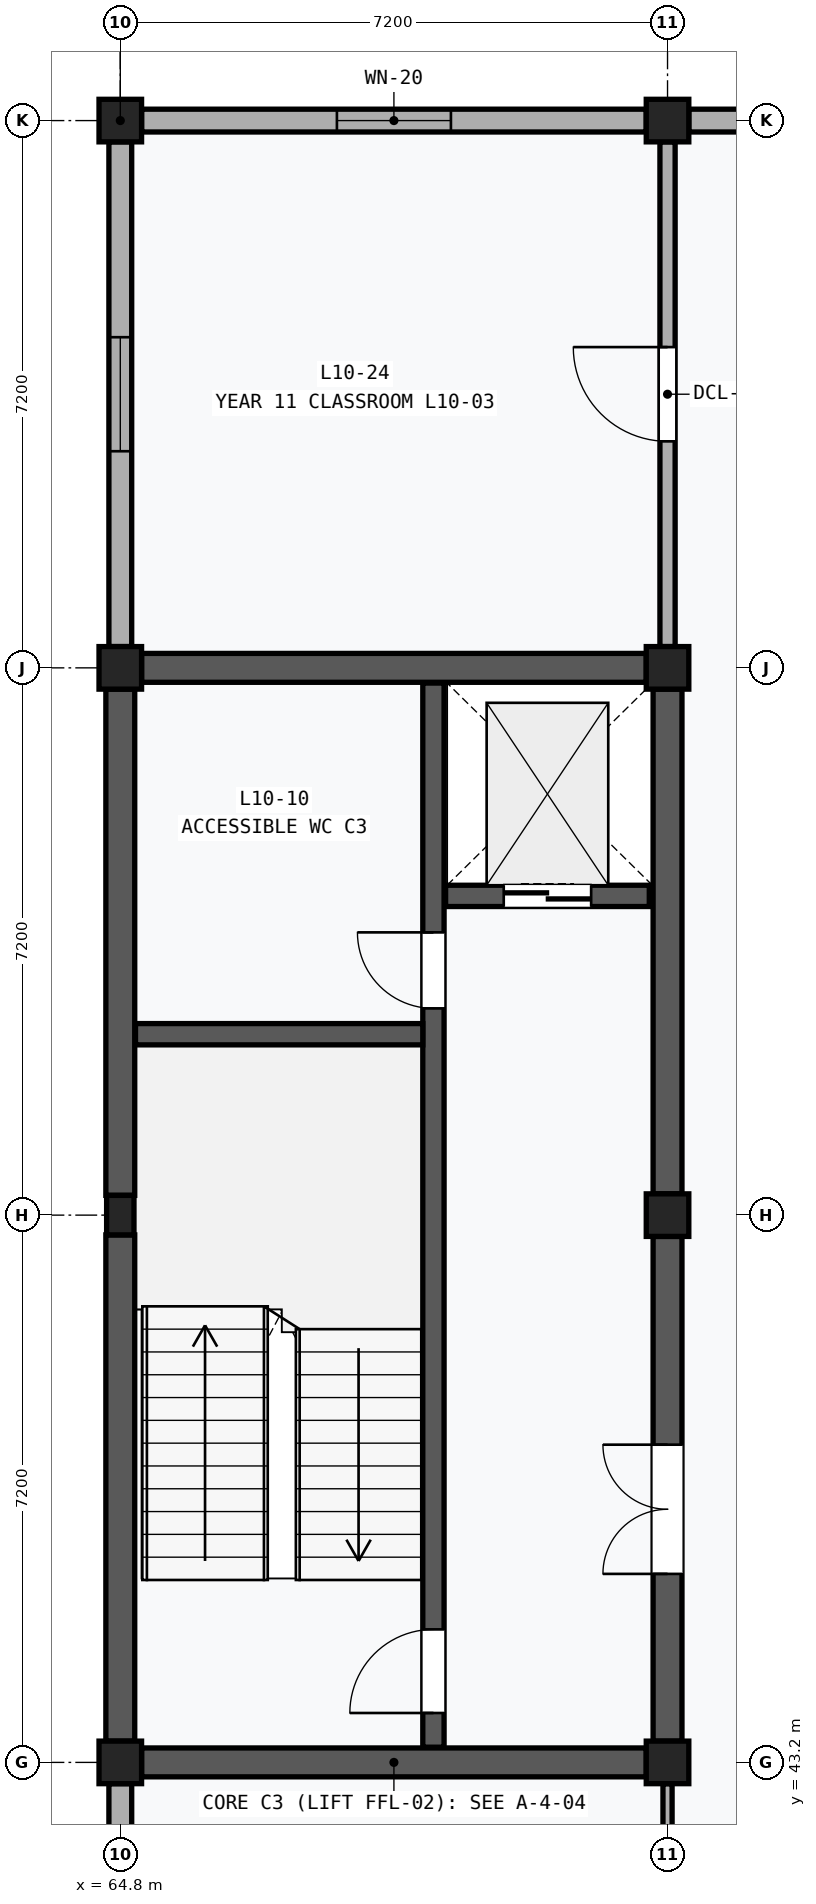
"""IFC4 building model, lengths in metres.
Left out: names, types, materials, properties, quantities, classifications, styles, units other than length and angle.
Written with IfcOpenShell. Run it as: python <this file> out.ifc"""

import sys

from ifc_helpers import new_model, si_unit, direction, frame, frame_2d, origin, origin_2d, place, context, subcontext, project, spatial, rectangle, extrude, element, fill, save


model = new_model("IFC4")
c1 = context("Model", 3, precision=1e-05, world=origin(), true_north=direction((0.0, 1.0)))
c2 = subcontext(c1, "Body", "Model", "MODEL_VIEW")
j1 = project(units=[si_unit("LENGTHUNIT", "METRE"), si_unit("PLANEANGLEUNIT", "RADIAN")], contexts=[c1])
p1 = place(None, origin())
s1 = spatial("IfcSite", under=j1, at=p1, CompositionType="ELEMENT")
p2 = place(p1, origin())
s2 = spatial("IfcBuilding", under=s1, at=p2, CompositionType="ELEMENT")
p3 = place(p2, frame((0.0, 0.0, 42.8)))
s3 = spatial("IfcBuildingStorey", under=s2, at=p3, CompositionType="ELEMENT", Elevation=42.8)
p4 = place(p3, frame((64.8, 43.2, 0.0), z_axis=(0.0, 0.0, 1.0), x_axis=(1.0, 0.0, 0.0)))
e1 = element("IfcColumn", 1, at=p4, inside=s3, PredefinedType="COLUMN", context=c2, shape_type="SweptSolid", body=[
    extrude(rectangle(XDim=0.56, YDim=0.56, at=origin_2d()), origin(), (0.0, 0.0, 1.0), 4.0),
])
p5 = place(p3, frame((64.8, 50.4, 0.0), z_axis=(0.0, 0.0, 1.0), x_axis=(1.0, 0.0, 0.0)))
e2 = element("IfcColumn", 2, at=p5, inside=s3, PredefinedType="PILASTER", context=c2, shape_type="SweptSolid", body=[
    extrude(rectangle(XDim=0.36, YDim=0.52, at=origin_2d()), origin(), (0.0, 0.0, 1.0), 4.0),
])
for number, where, z_axis, x_axis in (
    (3, (64.8, 57.6, 0.0), (0.0, 0.0, 1.0), (1.0, 0.0, 0.0)),
    (4, (64.8, 64.8, 0.0), (0.0, 0.0, 1.0), (1.0, 0.0, 0.0)),
    (5, (72.0, 43.2, 0.0), (0.0, 0.0, 1.0), (1.0, 0.0, 0.0)),
    (6, (72.0, 50.4, 0.0), (0.0, 0.0, 1.0), (1.0, 0.0, 0.0)),
    (7, (72.0, 57.6, 0.0), (0.0, 0.0, 1.0), (1.0, 0.0, 0.0)),
    (8, (72.0, 64.8, 0.0), (0.0, 0.0, 1.0), (1.0, 0.0, 0.0)),
):
    element("IfcColumn", number, at=place(p3, frame(where, z_axis=z_axis, x_axis=x_axis)), inside=s3, PredefinedType="COLUMN", context=c2, shape_type="SweptSolid", body=[
        extrude(rectangle(XDim=0.56, YDim=0.56, at=origin_2d()), origin(), (0.0, 0.0, 1.0), 4.0),
    ])
p6 = place(p3, frame((64.8, 36.28, 0.0), z_axis=(0.0, 0.0, 1.0), x_axis=(0.0, 1.0, 0.0)))
e9 = element("IfcWall", 9, at=p6, inside=s3, PredefinedType="SOLIDWALL", context=c2, shape_type="SweptSolid", body=[
    extrude(rectangle(XDim=6.64, YDim=0.3, at=frame_2d((3.32, 0.0))), origin(), (0.0, 0.0, 1.0), 3.18),
])
p7 = place(p3, frame((65.08, 64.8, 0.0), z_axis=(0.0, 0.0, 1.0), x_axis=(1.0, 0.0, 0.0)))
e10 = element("IfcWall", 10, at=p7, inside=s3, PredefinedType="SOLIDWALL", context=c2, shape_type="SweptSolid", body=[
    extrude(rectangle(XDim=6.64, YDim=0.3, at=frame_2d((3.32, 0.0))), origin(), (0.0, 0.0, 1.0), 3.18),
])
p8 = place(p7, frame((2.57, 0.0, 1.1)))
e11 = element("IfcOpeningElement", 11, at=p8, cuts=e10, PredefinedType="OPENING", context=c2, shape_type="SweptSolid", body=[
    extrude(rectangle(XDim=1.5, YDim=1.35, at=frame_2d((0.75, 0.675))), frame((0.0, 0.162, 0.0), z_axis=(0.0, -1.0, 0.0), x_axis=(1.0, 0.0, 0.0)), (0.0, 0.0, 1.0), 0.324),
])
p9 = place(p3, frame((64.8, 57.88, 0.0), z_axis=(0.0, 0.0, 1.0), x_axis=(0.0, 1.0, 0.0)))
e12 = element("IfcWall", 12, at=p9, inside=s3, PredefinedType="SOLIDWALL", context=c2, shape_type="SweptSolid", body=[
    extrude(rectangle(XDim=6.64, YDim=0.3, at=frame_2d((3.32, 0.0))), origin(), (0.0, 0.0, 1.0), 3.18),
])
p10 = place(p9, frame((2.57, 0.0, 1.1)))
e13 = element("IfcOpeningElement", 13, at=p10, cuts=e12, PredefinedType="OPENING", context=c2, shape_type="SweptSolid", body=[
    extrude(rectangle(XDim=1.5, YDim=1.35, at=frame_2d((0.75, 0.675))), frame((0.0, 0.162, 0.0), z_axis=(0.0, -1.0, 0.0), x_axis=(1.0, 0.0, 0.0)), (0.0, 0.0, 1.0), 0.324),
])
p11 = place(p3, frame((72.28, 64.8, 0.0), z_axis=(0.0, 0.0, 1.0), x_axis=(1.0, 0.0, 0.0)))
e14 = element("IfcWall", 14, at=p11, inside=s3, PredefinedType="SOLIDWALL", context=c2, shape_type="SweptSolid", body=[
    extrude(rectangle(XDim=6.74, YDim=0.3, at=frame_2d((3.37, 0.0))), origin(), (0.0, 0.0, 1.0), 3.18),
])
p12 = place(p11, frame((2.47, 0.0, 0.9)))
e15 = element("IfcOpeningElement", 15, at=p12, cuts=e14, PredefinedType="OPENING", context=c2, shape_type="SweptSolid", body=[
    extrude(rectangle(XDim=1.8, YDim=1.8, at=frame_2d((0.9, 0.9))), frame((0.0, 0.162, 0.0), z_axis=(0.0, -1.0, 0.0), x_axis=(1.0, 0.0, 0.0)), (0.0, 0.0, 1.0), 0.324),
])
p13 = place(p3, frame((64.8, 43.48, 0.0), z_axis=(0.0, 0.0, 1.0), x_axis=(0.0, 1.0, 0.0)))
e16 = element("IfcWall", 16, at=p13, inside=s3, PredefinedType="SHEAR", context=c2, shape_type="SweptSolid", body=[
    extrude(rectangle(XDim=6.66, YDim=0.38, at=frame_2d((3.33, 0.0))), origin(), (0.0, 0.0, 1.0), 3.18),
])
p14 = place(p3, frame((64.8, 50.66, 0.0), z_axis=(0.0, 0.0, 1.0), x_axis=(0.0, 1.0, 0.0)))
e17 = element("IfcWall", 17, at=p14, inside=s3, PredefinedType="SHEAR", context=c2, shape_type="SweptSolid", body=[
    extrude(rectangle(XDim=6.66, YDim=0.38, at=frame_2d((3.33, 0.0))), origin(), (0.0, 0.0, 1.0), 3.18),
])
p15 = place(p3, frame((72.0, 43.48, 0.0), z_axis=(0.0, 0.0, 1.0), x_axis=(0.0, 1.0, 0.0)))
e18 = element("IfcWall", 18, at=p15, inside=s3, PredefinedType="SHEAR", context=c2, shape_type="SweptSolid", body=[
    extrude(rectangle(XDim=6.64, YDim=0.38, at=frame_2d((3.32, 0.0))), origin(), (0.0, 0.0, 1.0), 3.02),
])
p16 = place(p15, frame((2.2, 0.0, 0.0)))
e19 = element("IfcOpeningElement", 19, at=p16, cuts=e18, PredefinedType="OPENING", context=c2, shape_type="SweptSolid", body=[
    extrude(rectangle(XDim=1.7, YDim=2.25, at=frame_2d((0.85, 1.125))), frame((0.0, 0.202, 0.0), z_axis=(0.0, -1.0, 0.0), x_axis=(1.0, 0.0, 0.0)), (0.0, 0.0, 1.0), 0.404),
])
p17 = place(p3, frame((72.0, 50.68, 0.0), z_axis=(0.0, 0.0, 1.0), x_axis=(0.0, 1.0, 0.0)))
e20 = element("IfcWall", 20, at=p17, inside=s3, PredefinedType="SHEAR", context=c2, shape_type="SweptSolid", body=[
    extrude(rectangle(XDim=6.64, YDim=0.38, at=frame_2d((3.32, 0.0))), origin(), (0.0, 0.0, 1.0), 3.02),
])
for number, where, z_axis, x_axis in (
    (21, (65.08, 43.2, 0.0), (0.0, 0.0, 1.0), (1.0, 0.0, 0.0)),
    (22, (65.08, 57.6, 0.0), (0.0, 0.0, 1.0), (1.0, 0.0, 0.0)),
):
    element("IfcWall", number, at=place(p3, frame(where, z_axis=z_axis, x_axis=x_axis)), inside=s3, PredefinedType="SHEAR", context=c2, shape_type="SweptSolid", body=[
        extrude(rectangle(XDim=6.64, YDim=0.38, at=frame_2d((3.32, 0.0))), origin(), (0.0, 0.0, 1.0), 3.02),
    ])
p18 = place(p3, frame((68.92, 43.4, 0.0), z_axis=(0.0, 0.0, 1.0), x_axis=(0.0, 1.0, 0.0)))
e23 = element("IfcWall", 23, at=p18, inside=s3, PredefinedType="SHEAR", context=c2, shape_type="SweptSolid", body=[
    extrude(rectangle(XDim=14.0, YDim=0.28, at=frame_2d((7.0, 0.0))), origin(), (0.0, 0.0, 1.0), 3.75),
])
p19 = place(p18, frame((0.45, 0.0, 0.0)))
e24 = element("IfcOpeningElement", 24, at=p19, cuts=e23, PredefinedType="OPENING", context=c2, shape_type="SweptSolid", body=[
    extrude(rectangle(XDim=1.1, YDim=2.15, at=frame_2d((0.55, 1.075))), frame((0.0, 0.152, 0.0), z_axis=(0.0, -1.0, 0.0), x_axis=(1.0, 0.0, 0.0)), (0.0, 0.0, 1.0), 0.304),
])
p20 = place(p18, frame((9.72, 0.0, 0.0)))
e25 = element("IfcOpeningElement", 25, at=p20, cuts=e23, PredefinedType="OPENING", context=c2, shape_type="SweptSolid", body=[
    extrude(rectangle(XDim=1.0, YDim=2.15, at=frame_2d((0.5, 1.075))), frame((0.0, 0.152, 0.0), z_axis=(0.0, -1.0, 0.0), x_axis=(1.0, 0.0, 0.0)), (0.0, 0.0, 1.0), 0.304),
])
p21 = place(p3, frame((65.0, 52.78, 0.0), z_axis=(0.0, 0.0, 1.0), x_axis=(1.0, 0.0, 0.0)))
e26 = element("IfcWall", 26, at=p21, inside=s3, PredefinedType="SHEAR", context=c2, shape_type="SweptSolid", body=[
    extrude(rectangle(XDim=3.78, YDim=0.28, at=frame_2d((1.89, 0.0))), origin(), (0.0, 0.0, 1.0), 3.75),
])
p22 = place(p3, frame((69.08, 54.6, 0.0), z_axis=(0.0, 0.0, 1.0), x_axis=(1.0, 0.0, 0.0)))
e27 = element("IfcWall", 27, at=p22, inside=s3, PredefinedType="SHEAR", context=c2, shape_type="SweptSolid", body=[
    extrude(rectangle(XDim=2.68, YDim=0.28, at=frame_2d((1.34, 0.0))), origin(), (0.0, 0.0, 1.0), 3.75),
])
p23 = place(p22, frame((0.765, 0.0, 0.0)))
e28 = element("IfcOpeningElement", 28, at=p23, cuts=e27, PredefinedType="OPENING", context=c2, shape_type="SweptSolid", body=[
    extrude(rectangle(XDim=1.15, YDim=2.2, at=frame_2d((0.575, 1.1))), frame((0.0, 0.152, 0.0), z_axis=(0.0, -1.0, 0.0), x_axis=(1.0, 0.0, 0.0)), (0.0, 0.0, 1.0), 0.304),
])
p24 = place(p3, frame((72.0, 36.28, 0.0), z_axis=(0.0, 0.0, 1.0), x_axis=(0.0, 1.0, 0.0)))
e29 = element("IfcWall", 29, at=p24, inside=s3, PredefinedType="MOVABLE", context=c2, shape_type="SweptSolid", body=[
    extrude(rectangle(XDim=6.64, YDim=0.12, at=frame_2d((3.32, 0.0))), origin(), (0.0, 0.0, 1.0), 3.02),
])
p25 = place(p3, frame((72.0, 57.88, 0.0), z_axis=(0.0, 0.0, 1.0), x_axis=(0.0, 1.0, 0.0)))
e30 = element("IfcWall", 30, at=p25, inside=s3, PredefinedType="PARTITIONING", context=c2, shape_type="SweptSolid", body=[
    extrude(rectangle(XDim=6.64, YDim=0.2, at=frame_2d((3.32, 0.0))), origin(), (0.0, 0.0, 1.0), 3.02),
])
p26 = place(p25, frame((2.7, 0.0, 0.0)))
e31 = element("IfcOpeningElement", 31, at=p26, cuts=e30, PredefinedType="OPENING", context=c2, shape_type="SweptSolid", body=[
    extrude(rectangle(XDim=1.24, YDim=2.26, at=frame_2d((0.62, 1.13))), frame((0.0, 0.112, 0.0), z_axis=(0.0, -1.0, 0.0), x_axis=(1.0, 0.0, 0.0)), (0.0, 0.0, 1.0), 0.224),
])
p27 = place(p8, origin())
e32 = element("IfcWindow", 32, at=p27, inside=s3, PartitioningType="SINGLE_PANEL", PredefinedType="WINDOW", context=c2, shape_type="SweptSolid", body=[
    extrude(rectangle(XDim=1.5, YDim=1.35, at=frame_2d((0.75, 0.675))), frame((0.0, 0.03, 0.0), z_axis=(0.0, -1.0, 0.0), x_axis=(1.0, 0.0, 0.0)), (0.0, 0.0, 1.0), 0.06),
])
fill(e11, e32)
p28 = place(p10, origin())
e33 = element("IfcWindow", 33, at=p28, inside=s3, PartitioningType="SINGLE_PANEL", PredefinedType="WINDOW", context=c2, shape_type="SweptSolid", body=[
    extrude(rectangle(XDim=1.5, YDim=1.35, at=frame_2d((0.75, 0.675))), frame((0.0, 0.03, 0.0), z_axis=(0.0, -1.0, 0.0), x_axis=(1.0, 0.0, 0.0)), (0.0, 0.0, 1.0), 0.06),
])
fill(e13, e33)
p29 = place(p16, origin())
e34 = element("IfcDoor", 34, at=p29, inside=s3, OperationType="DOUBLE_DOOR_SINGLE_SWING", PredefinedType="DOOR", context=c2, shape_type="SweptSolid", body=[
    extrude(rectangle(XDim=1.7, YDim=2.25, at=frame_2d((0.85, 1.125))), frame((0.0, 0.025, 0.0), z_axis=(0.0, -1.0, 0.0), x_axis=(1.0, 0.0, 0.0)), (0.0, 0.0, 1.0), 0.05),
])
fill(e19, e34)
p30 = place(p19, origin())
e35 = element("IfcDoor", 35, at=p30, inside=s3, OperationType="SINGLE_SWING_LEFT", PredefinedType="DOOR", context=c2, shape_type="SweptSolid", body=[
    extrude(rectangle(XDim=1.1, YDim=2.15, at=frame_2d((0.55, 1.075))), frame((0.0, 0.025, 0.0), z_axis=(0.0, -1.0, 0.0), x_axis=(1.0, 0.0, 0.0)), (0.0, 0.0, 1.0), 0.05),
])
fill(e24, e35)
p31 = place(p20, origin())
e36 = element("IfcDoor", 36, at=p31, inside=s3, OperationType="SINGLE_SWING_RIGHT", PredefinedType="DOOR", context=c2, shape_type="SweptSolid", body=[
    extrude(rectangle(XDim=1.0, YDim=2.15, at=frame_2d((0.5, 1.075))), frame((0.0, 0.025, 0.0), z_axis=(0.0, -1.0, 0.0), x_axis=(1.0, 0.0, 0.0)), (0.0, 0.0, 1.0), 0.05),
])
fill(e25, e36)
p32 = place(p23, frame((1.15, 0.0, 0.0), z_axis=(0.0, 0.0, 1.0), x_axis=(-1.0, 0.0, 0.0)))
e37 = element("IfcDoor", 37, at=p32, inside=s3, OperationType="DOUBLE_DOOR_SLIDING", PredefinedType="DOOR", context=c2, shape_type="SweptSolid", body=[
    extrude(rectangle(XDim=1.15, YDim=2.2, at=frame_2d((0.575, 1.1))), frame((0.0, 0.025, 0.0), z_axis=(0.0, -1.0, 0.0), x_axis=(1.0, 0.0, 0.0)), (0.0, 0.0, 1.0), 0.05),
])
fill(e28, e37)
p33 = place(p26, origin())
e38 = element("IfcDoor", 38, at=p33, inside=s3, OperationType="SINGLE_SWING_RIGHT", PredefinedType="DOOR", context=c2, shape_type="SweptSolid", body=[
    extrude(rectangle(XDim=1.24, YDim=2.26, at=frame_2d((0.62, 1.13))), frame((0.0, 0.025, 0.0), z_axis=(0.0, -1.0, 0.0), x_axis=(1.0, 0.0, 0.0)), (0.0, 0.0, 1.0), 0.05),
])
fill(e31, e38)
save(model, sys.argv[1])
